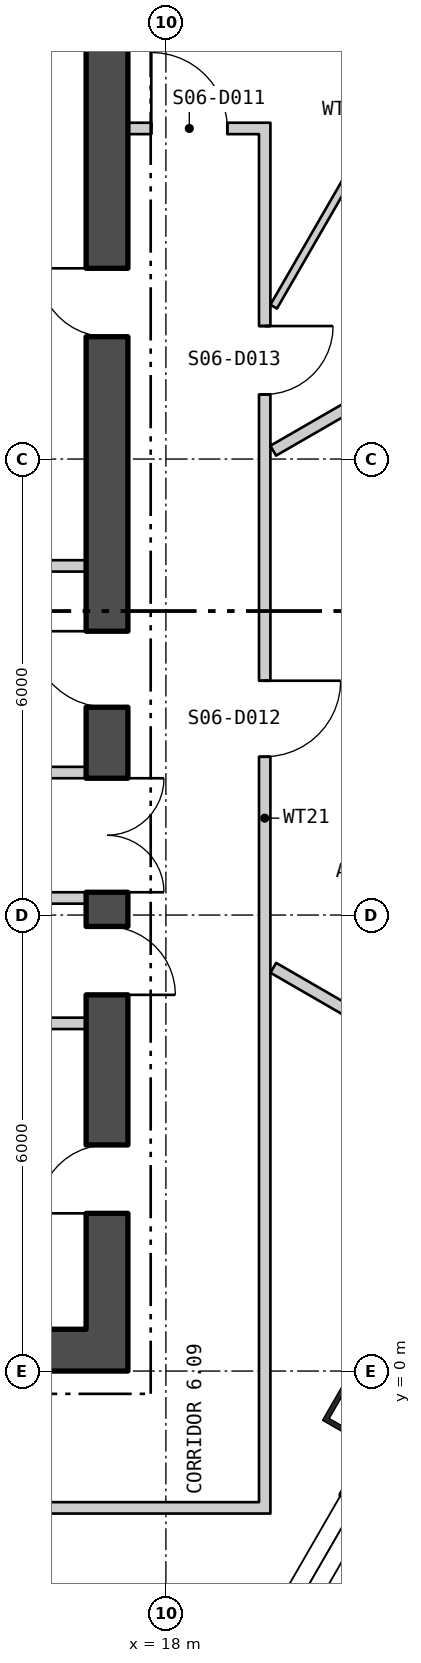
"""IFC4 building model, lengths in metres.
Left out: names, types, materials, properties, quantities, classifications, styles, units other than length and angle.
Written with IfcOpenShell. Run it as: python <this file> out.ifc"""

import sys

from ifc_helpers import new_model, si_unit, direction, frame, frame_2d, origin, origin_2d, place, context, subcontext, project, spatial, polyline, rectangle, hollow_rectangle, outline, extrude, element, fill, save


model = new_model("IFC4")
c1 = context("Model", 3, precision=1e-05, world=origin(), true_north=direction((0.0, 1.0)))
c2 = subcontext(c1, "Body", "Model", "MODEL_VIEW")
j1 = project(units=[si_unit("LENGTHUNIT", "METRE"), si_unit("PLANEANGLEUNIT", "RADIAN")], contexts=[c1])
p1 = place(None, origin())
s1 = spatial("IfcSite", under=j1, at=p1, CompositionType="ELEMENT")
p2 = place(p1, origin())
s2 = spatial("IfcBuilding", under=s1, at=p2, CompositionType="ELEMENT")
p3 = place(p2, frame((0.0, 0.0, 84.3)))
s3 = spatial("IfcBuildingStorey", under=s2, at=p3, CompositionType="ELEMENT", Elevation=84.3)
p4 = place(p3, frame((20.526, -0.541, 0.0), z_axis=(0.0, 0.0, 1.0), x_axis=(0.5, 0.866025403784, 0.0)))
e1 = element("IfcColumn", 1, at=p4, inside=s3, PredefinedType="COLUMN", context=c2, shape_type="SweptSolid", body=[
    extrude(hollow_rectangle(XDim=0.65, YDim=0.7, WallThickness=0.065, at=origin_2d()), origin(), (0.0, 0.0, 1.0), 4.5),
])
p5 = place(p3, frame((5.085, -28.436, -0.18), z_axis=(0.0, 0.0, 1.0), x_axis=(0.499999194392, 0.866025868902, 0.0)))
e2 = element("IfcWall", 2, at=p5, inside=s3, PredefinedType="SOLIDWALL", context=c2, shape_type="SweptSolid", body=[
    extrude(outline(polyline([(-0.13, -0.225), (45.86, -0.225), (45.6, 0.225), (0.13, 0.225), (-0.13, -0.225)])), origin(), (0.0, 0.0, 1.0), 4.28),
])
p6 = place(p5, frame((1.424, 0.0, 1.08)))
e3 = element("IfcOpeningElement", 3, at=p6, cuts=e2, PredefinedType="OPENING", context=c2, shape_type="SweptSolid", body=[
    extrude(rectangle(XDim=2.4, YDim=2.6, at=frame_2d((1.2, 1.3))), frame((0.0, 0.235, 0.0), z_axis=(0.0, -1.0, 0.0), x_axis=(1.0, 0.0, 0.0)), (0.0, 0.0, 1.0), 0.47),
])
p7 = place(p5, frame((5.892, 0.0, 1.08)))
e4 = element("IfcOpeningElement", 4, at=p7, cuts=e2, PredefinedType="OPENING", context=c2, shape_type="SweptSolid", body=[
    extrude(rectangle(XDim=2.4, YDim=2.6, at=frame_2d((1.2, 1.3))), frame((0.0, 0.235, 0.0), z_axis=(0.0, -1.0, 0.0), x_axis=(1.0, 0.0, 0.0)), (0.0, 0.0, 1.0), 0.47),
])
p8 = place(p5, frame((10.399, 0.0, 1.08)))
e5 = element("IfcOpeningElement", 5, at=p8, cuts=e2, PredefinedType="OPENING", context=c2, shape_type="SweptSolid", body=[
    extrude(rectangle(XDim=2.4, YDim=2.6, at=frame_2d((1.2, 1.3))), frame((0.0, 0.235, 0.0), z_axis=(0.0, -1.0, 0.0), x_axis=(1.0, 0.0, 0.0)), (0.0, 0.0, 1.0), 0.47),
])
p9 = place(p5, frame((14.905, 0.0, 1.08)))
e6 = element("IfcOpeningElement", 6, at=p9, cuts=e2, PredefinedType="OPENING", context=c2, shape_type="SweptSolid", body=[
    extrude(rectangle(XDim=2.4, YDim=2.6, at=frame_2d((1.2, 1.3))), frame((0.0, 0.235, 0.0), z_axis=(0.0, -1.0, 0.0), x_axis=(1.0, 0.0, 0.0)), (0.0, 0.0, 1.0), 0.47),
])
p10 = place(p5, frame((19.412, 0.0, 1.08)))
e7 = element("IfcOpeningElement", 7, at=p10, cuts=e2, PredefinedType="OPENING", context=c2, shape_type="SweptSolid", body=[
    extrude(rectangle(XDim=2.4, YDim=2.6, at=frame_2d((1.2, 1.3))), frame((0.0, 0.235, 0.0), z_axis=(0.0, -1.0, 0.0), x_axis=(1.0, 0.0, 0.0)), (0.0, 0.0, 1.0), 0.47),
])
p11 = place(p5, frame((23.918, 0.0, 1.08)))
e8 = element("IfcOpeningElement", 8, at=p11, cuts=e2, PredefinedType="OPENING", context=c2, shape_type="SweptSolid", body=[
    extrude(rectangle(XDim=2.4, YDim=2.6, at=frame_2d((1.2, 1.3))), frame((0.0, 0.235, 0.0), z_axis=(0.0, -1.0, 0.0), x_axis=(1.0, 0.0, 0.0)), (0.0, 0.0, 1.0), 0.47),
])
p12 = place(p5, frame((28.425, 0.0, 1.08)))
e9 = element("IfcOpeningElement", 9, at=p12, cuts=e2, PredefinedType="OPENING", context=c2, shape_type="SweptSolid", body=[
    extrude(rectangle(XDim=2.4, YDim=2.6, at=frame_2d((1.2, 1.3))), frame((0.0, 0.235, 0.0), z_axis=(0.0, -1.0, 0.0), x_axis=(1.0, 0.0, 0.0)), (0.0, 0.0, 1.0), 0.47),
])
p13 = place(p5, frame((32.932, 0.0, 1.08)))
e10 = element("IfcOpeningElement", 10, at=p13, cuts=e2, PredefinedType="OPENING", context=c2, shape_type="SweptSolid", body=[
    extrude(rectangle(XDim=2.4, YDim=2.6, at=frame_2d((1.2, 1.3))), frame((0.0, 0.235, 0.0), z_axis=(0.0, -1.0, 0.0), x_axis=(1.0, 0.0, 0.0)), (0.0, 0.0, 1.0), 0.47),
])
p14 = place(p5, frame((37.438, 0.0, 1.08)))
e11 = element("IfcOpeningElement", 11, at=p14, cuts=e2, PredefinedType="OPENING", context=c2, shape_type="SweptSolid", body=[
    extrude(rectangle(XDim=2.4, YDim=2.6, at=frame_2d((1.2, 1.3))), frame((0.0, 0.235, 0.0), z_axis=(0.0, -1.0, 0.0), x_axis=(1.0, 0.0, 0.0)), (0.0, 0.0, 1.0), 0.47),
])
p15 = place(p5, frame((41.907, 0.0, 1.08)))
e12 = element("IfcOpeningElement", 12, at=p15, cuts=e2, PredefinedType="OPENING", context=c2, shape_type="SweptSolid", body=[
    extrude(rectangle(XDim=2.4, YDim=2.6, at=frame_2d((1.2, 1.3))), frame((0.0, 0.235, 0.0), z_axis=(0.0, -1.0, 0.0), x_axis=(1.0, 0.0, 0.0)), (0.0, 0.0, 1.0), 0.47),
])
p16 = place(p3, frame((-17.5, 0.275, 0.0), z_axis=(0.0, 0.0, 1.0), x_axis=(1.0, 0.0, 0.0)))
e13 = element("IfcWall", 13, at=p16, inside=s3, PredefinedType="SHEAR", context=c2, shape_type="SweptSolid", body=[
    extrude(rectangle(XDim=35.0, YDim=0.55, at=frame_2d((17.5, 0.0))), origin(), (0.0, 0.0, 1.0), 4.3),
])
p17 = place(p16, frame((12.0, 0.0, 0.0)))
e14 = element("IfcOpeningElement", 14, at=p17, cuts=e13, PredefinedType="OPENING", context=c2, shape_type="SweptSolid", body=[
    extrude(rectangle(XDim=1.8, YDim=2.4, at=frame_2d((0.9, 1.2))), frame((0.0, 0.285, 0.0), z_axis=(0.0, -1.0, 0.0), x_axis=(1.0, 0.0, 0.0)), (0.0, 0.0, 1.0), 0.57),
])
p18 = place(p16, frame((22.0, 0.0, 0.0)))
e15 = element("IfcOpeningElement", 15, at=p18, cuts=e13, PredefinedType="OPENING", context=c2, shape_type="SweptSolid", body=[
    extrude(rectangle(XDim=1.8, YDim=2.4, at=frame_2d((0.9, 1.2))), frame((0.0, 0.285, 0.0), z_axis=(0.0, -1.0, 0.0), x_axis=(1.0, 0.0, 0.0)), (0.0, 0.0, 1.0), 0.57),
])
p19 = place(p3, frame((17.225, 0.55, 0.0), z_axis=(0.0, 0.0, 1.0), x_axis=(0.0, 1.0, 0.0)))
e16 = element("IfcWall", 16, at=p19, inside=s3, PredefinedType="SHEAR", context=c2, shape_type="SweptSolid", body=[
    extrude(rectangle(XDim=16.9, YDim=0.55, at=frame_2d((8.45, 0.0))), origin(), (0.0, 0.0, 1.0), 4.3),
])
p20 = place(p19, frame((5.75, 0.0, 0.0)))
e17 = element("IfcOpeningElement", 17, at=p20, cuts=e16, PredefinedType="OPENING", context=c2, shape_type="SweptSolid", body=[
    extrude(rectangle(XDim=1.5, YDim=2.1, at=frame_2d((0.75, 1.05))), frame((0.0, 0.285, 0.0), z_axis=(0.0, -1.0, 0.0), x_axis=(1.0, 0.0, 0.0)), (0.0, 0.0, 1.0), 0.57),
])
p21 = place(p19, frame((1.525, 0.0, 0.0)))
e18 = element("IfcOpeningElement", 18, at=p21, cuts=e16, PredefinedType="OPENING", context=c2, shape_type="SweptSolid", body=[
    extrude(rectangle(XDim=0.9, YDim=2.1, at=frame_2d((0.45, 1.05))), frame((0.0, 0.285, 0.0), z_axis=(0.0, -1.0, 0.0), x_axis=(1.0, 0.0, 0.0)), (0.0, 0.0, 1.0), 0.57),
])
p22 = place(p19, frame((4.4, 0.0, 0.0)))
e19 = element("IfcOpeningElement", 19, at=p22, cuts=e16, PredefinedType="OPENING", context=c2, shape_type="SweptSolid", body=[
    extrude(rectangle(XDim=0.9, YDim=2.1, at=frame_2d((0.45, 1.05))), frame((0.0, 0.285, 0.0), z_axis=(0.0, -1.0, 0.0), x_axis=(1.0, 0.0, 0.0)), (0.0, 0.0, 1.0), 0.57),
])
p23 = place(p19, frame((8.184, 0.0, 0.0)))
e20 = element("IfcOpeningElement", 20, at=p23, cuts=e16, PredefinedType="OPENING", context=c2, shape_type="SweptSolid", body=[
    extrude(rectangle(XDim=1.0, YDim=2.1, at=frame_2d((0.5, 1.05))), frame((0.0, 0.285, 0.0), z_axis=(0.0, -1.0, 0.0), x_axis=(1.0, 0.0, 0.0)), (0.0, 0.0, 1.0), 0.57),
])
p24 = place(p19, frame((13.059, 0.0, 0.0)))
e21 = element("IfcOpeningElement", 21, at=p24, cuts=e16, PredefinedType="OPENING", context=c2, shape_type="SweptSolid", body=[
    extrude(rectangle(XDim=0.9, YDim=2.1, at=frame_2d((0.45, 1.05))), frame((0.0, 0.285, 0.0), z_axis=(0.0, -1.0, 0.0), x_axis=(1.0, 0.0, 0.0)), (0.0, 0.0, 1.0), 0.57),
])
for number, where, z_axis, x_axis in (
    (22, (14.5, 6.225, 0.0), (0.0, 0.0, 1.0), (1.0, 0.0, 0.0)),
    (23, (14.5, 7.875, 0.0), (0.0, 0.0, 1.0), (1.0, 0.0, 0.0)),
    (24, (14.5, 4.575, 0.0), (0.0, 0.0, 1.0), (1.0, 0.0, 0.0)),
    (25, (14.5, 10.594, 0.0), (0.0, 0.0, 1.0), (1.0, 0.0, 0.0)),
):
    element("IfcWall", number, at=place(p3, frame(where, z_axis=z_axis, x_axis=x_axis)), inside=s3, PredefinedType="PARTITIONING", context=c2, shape_type="SweptSolid", body=[
        extrude(rectangle(XDim=2.45, YDim=0.15, at=frame_2d((1.225, 0.0))), origin(), (0.0, 0.0, 1.0), 4.3),
    ])
p25 = place(p3, frame((7.685, -1.8, 0.0), z_axis=(0.0, 0.0, 1.0), x_axis=(1.0, 0.0, 0.0)))
e26 = element("IfcWall", 26, at=p25, inside=s3, PredefinedType="PARTITIONING", context=c2, shape_type="SweptSolid", body=[
    extrude(rectangle(XDim=11.54, YDim=0.15, at=frame_2d((5.77, 0.0))), origin(), (0.0, 0.0, 1.0), 4.3),
])
p26 = place(p3, frame((17.5, 16.35, 0.0), z_axis=(0.0, 0.0, 1.0), x_axis=(1.0, 0.0, 0.0)))
e27 = element("IfcWall", 27, at=p26, inside=s3, PredefinedType="PARTITIONING", context=c2, shape_type="SweptSolid", body=[
    extrude(rectangle(XDim=1.725, YDim=0.15, at=frame_2d((0.863, 0.0))), origin(), (0.0, 0.0, 1.0), 4.3),
])
p27 = place(p26, frame((0.308, 0.0, 0.0)))
e28 = element("IfcOpeningElement", 28, at=p27, cuts=e27, PredefinedType="OPENING", context=c2, shape_type="SweptSolid", body=[
    extrude(rectangle(XDim=1.0, YDim=2.1, at=frame_2d((0.5, 1.05))), frame((0.0, 0.085, 0.0), z_axis=(0.0, -1.0, 0.0), x_axis=(1.0, 0.0, 0.0)), (0.0, 0.0, 1.0), 0.17),
])
p28 = place(p3, frame((19.3, -1.875, 0.0), z_axis=(0.0, 0.0, 1.0), x_axis=(0.0, 1.0, 0.0)))
e29 = element("IfcWall", 29, at=p28, inside=s3, PredefinedType="PARTITIONING", context=c2, shape_type="SweptSolid", body=[
    extrude(rectangle(XDim=18.3, YDim=0.15, at=frame_2d((9.15, 0.0))), origin(), (0.0, 0.0, 1.0), 4.3),
])
p29 = place(p28, frame((9.958, 0.0, 0.0)))
e30 = element("IfcOpeningElement", 30, at=p29, cuts=e29, PredefinedType="OPENING", context=c2, shape_type="SweptSolid", body=[
    extrude(rectangle(XDim=1.0, YDim=2.1, at=frame_2d((0.5, 1.05))), frame((0.0, 0.085, 0.0), z_axis=(0.0, -1.0, 0.0), x_axis=(1.0, 0.0, 0.0)), (0.0, 0.0, 1.0), 0.17),
])
p30 = place(p28, frame((14.725, 0.0, 0.0)))
e31 = element("IfcOpeningElement", 31, at=p30, cuts=e29, PredefinedType="OPENING", context=c2, shape_type="SweptSolid", body=[
    extrude(rectangle(XDim=0.9, YDim=2.1, at=frame_2d((0.45, 1.05))), frame((0.0, 0.085, 0.0), z_axis=(0.0, -1.0, 0.0), x_axis=(1.0, 0.0, 0.0)), (0.0, 0.0, 1.0), 0.17),
])
p31 = place(p3, frame((19.412, 12.11, 0.0), z_axis=(0.0, 0.0, 1.0), x_axis=(0.866097636026, 0.499874869213, 0.0)))
e32 = element("IfcWall", 32, at=p31, inside=s3, PredefinedType="PARTITIONING", context=c2, shape_type="SweptSolid", body=[
    extrude(rectangle(XDim=6.248, YDim=0.15, at=frame_2d((3.124, 0.0))), origin(), (0.0, 0.0, 1.0), 4.3),
])
p32 = place(p3, frame((19.413, 5.306, 0.0), z_axis=(0.0, 0.0, 1.0), x_axis=(0.865835305332, -0.500329115724, 0.0)))
e33 = element("IfcWall", 33, at=p32, inside=s3, PredefinedType="PARTITIONING", context=c2, shape_type="SweptSolid", body=[
    extrude(rectangle(XDim=1.617, YDim=0.15, at=frame_2d((0.808, 0.0))), origin(), (0.0, 0.0, 1.0), 4.3),
])
p33 = place(p3, frame((19.418, 14.005, 0.0), z_axis=(0.0, 0.0, 1.0), x_axis=(0.500026652407, 0.866010015463, 0.0)))
e34 = element("IfcWall", 34, at=p33, inside=s3, PredefinedType="PARTITIONING", context=c2, shape_type="SweptSolid", body=[
    extrude(rectangle(XDim=5.976, YDim=0.1, at=frame_2d((2.988, 0.0))), origin(), (0.0, 0.0, 1.0), 4.3),
])
p34 = place(p12, origin())
e35 = element("IfcWindow", 35, at=p34, inside=s3, PartitioningType="SINGLE_PANEL", PredefinedType="WINDOW", context=c2, shape_type="SweptSolid", body=[
    extrude(rectangle(XDim=2.4, YDim=2.6, at=frame_2d((1.2, 1.3))), frame((0.0, 0.105, 0.0), z_axis=(0.0, -1.0, 0.0), x_axis=(1.0, 0.0, 0.0)), (0.0, 0.0, 1.0), 0.06),
])
fill(e9, e35)
p35 = place(p20, origin())
e36 = element("IfcDoor", 36, at=p35, inside=s3, OperationType="DOUBLE_DOOR_SINGLE_SWING", PredefinedType="DOOR", context=c2, shape_type="SweptSolid", body=[
    extrude(rectangle(XDim=1.5, YDim=2.1, at=frame_2d((0.75, 1.05))), frame((0.0, 0.025, 0.0), z_axis=(0.0, -1.0, 0.0), x_axis=(1.0, 0.0, 0.0)), (0.0, 0.0, 1.0), 0.05),
])
fill(e17, e36)
p36 = place(p21, origin())
e37 = element("IfcDoor", 37, at=p36, inside=s3, OperationType="SINGLE_SWING_RIGHT", PredefinedType="DOOR", context=c2, shape_type="SweptSolid", body=[
    extrude(rectangle(XDim=0.9, YDim=2.1, at=frame_2d((0.45, 1.05))), frame((0.0, 0.025, 0.0), z_axis=(0.0, -1.0, 0.0), x_axis=(1.0, 0.0, 0.0)), (0.0, 0.0, 1.0), 0.05),
])
fill(e18, e37)
p37 = place(p22, origin())
e38 = element("IfcDoor", 38, at=p37, inside=s3, OperationType="SINGLE_SWING_LEFT", PredefinedType="DOOR", context=c2, shape_type="SweptSolid", body=[
    extrude(rectangle(XDim=0.9, YDim=2.1, at=frame_2d((0.45, 1.05))), frame((0.0, 0.025, 0.0), z_axis=(0.0, -1.0, 0.0), x_axis=(1.0, 0.0, 0.0)), (0.0, 0.0, 1.0), 0.05),
])
fill(e19, e38)
p38 = place(p23, origin())
e39 = element("IfcDoor", 39, at=p38, inside=s3, OperationType="SINGLE_SWING_LEFT", PredefinedType="DOOR", context=c2, shape_type="SweptSolid", body=[
    extrude(rectangle(XDim=1.0, YDim=2.1, at=frame_2d((0.5, 1.05))), frame((0.0, 0.025, 0.0), z_axis=(0.0, -1.0, 0.0), x_axis=(1.0, 0.0, 0.0)), (0.0, 0.0, 1.0), 0.05),
])
fill(e20, e39)
p39 = place(p24, origin())
e40 = element("IfcDoor", 40, at=p39, inside=s3, OperationType="SINGLE_SWING_LEFT", PredefinedType="DOOR", context=c2, shape_type="SweptSolid", body=[
    extrude(rectangle(XDim=0.9, YDim=2.1, at=frame_2d((0.45, 1.05))), frame((0.0, 0.025, 0.0), z_axis=(0.0, -1.0, 0.0), x_axis=(1.0, 0.0, 0.0)), (0.0, 0.0, 1.0), 0.05),
])
fill(e21, e40)
p40 = place(p27, origin())
e41 = element("IfcDoor", 41, at=p40, inside=s3, OperationType="SINGLE_SWING_RIGHT", PredefinedType="DOOR", context=c2, shape_type="SweptSolid", body=[
    extrude(rectangle(XDim=1.0, YDim=2.1, at=frame_2d((0.5, 1.05))), frame((0.0, 0.025, 0.0), z_axis=(0.0, -1.0, 0.0), x_axis=(1.0, 0.0, 0.0)), (0.0, 0.0, 1.0), 0.05),
])
fill(e28, e41)
p41 = place(p29, origin())
e42 = element("IfcDoor", 42, at=p41, inside=s3, OperationType="SINGLE_SWING_RIGHT", PredefinedType="DOOR", context=c2, shape_type="SweptSolid", body=[
    extrude(rectangle(XDim=1.0, YDim=2.1, at=frame_2d((0.5, 1.05))), frame((0.0, 0.025, 0.0), z_axis=(0.0, -1.0, 0.0), x_axis=(1.0, 0.0, 0.0)), (0.0, 0.0, 1.0), 0.05),
])
fill(e30, e42)
p42 = place(p30, origin())
e43 = element("IfcDoor", 43, at=p42, inside=s3, OperationType="SINGLE_SWING_RIGHT", PredefinedType="DOOR", context=c2, shape_type="SweptSolid", body=[
    extrude(rectangle(XDim=0.9, YDim=2.1, at=frame_2d((0.45, 1.05))), frame((0.0, 0.025, 0.0), z_axis=(0.0, -1.0, 0.0), x_axis=(1.0, 0.0, 0.0)), (0.0, 0.0, 1.0), 0.05),
])
fill(e31, e43)
save(model, sys.argv[1])
